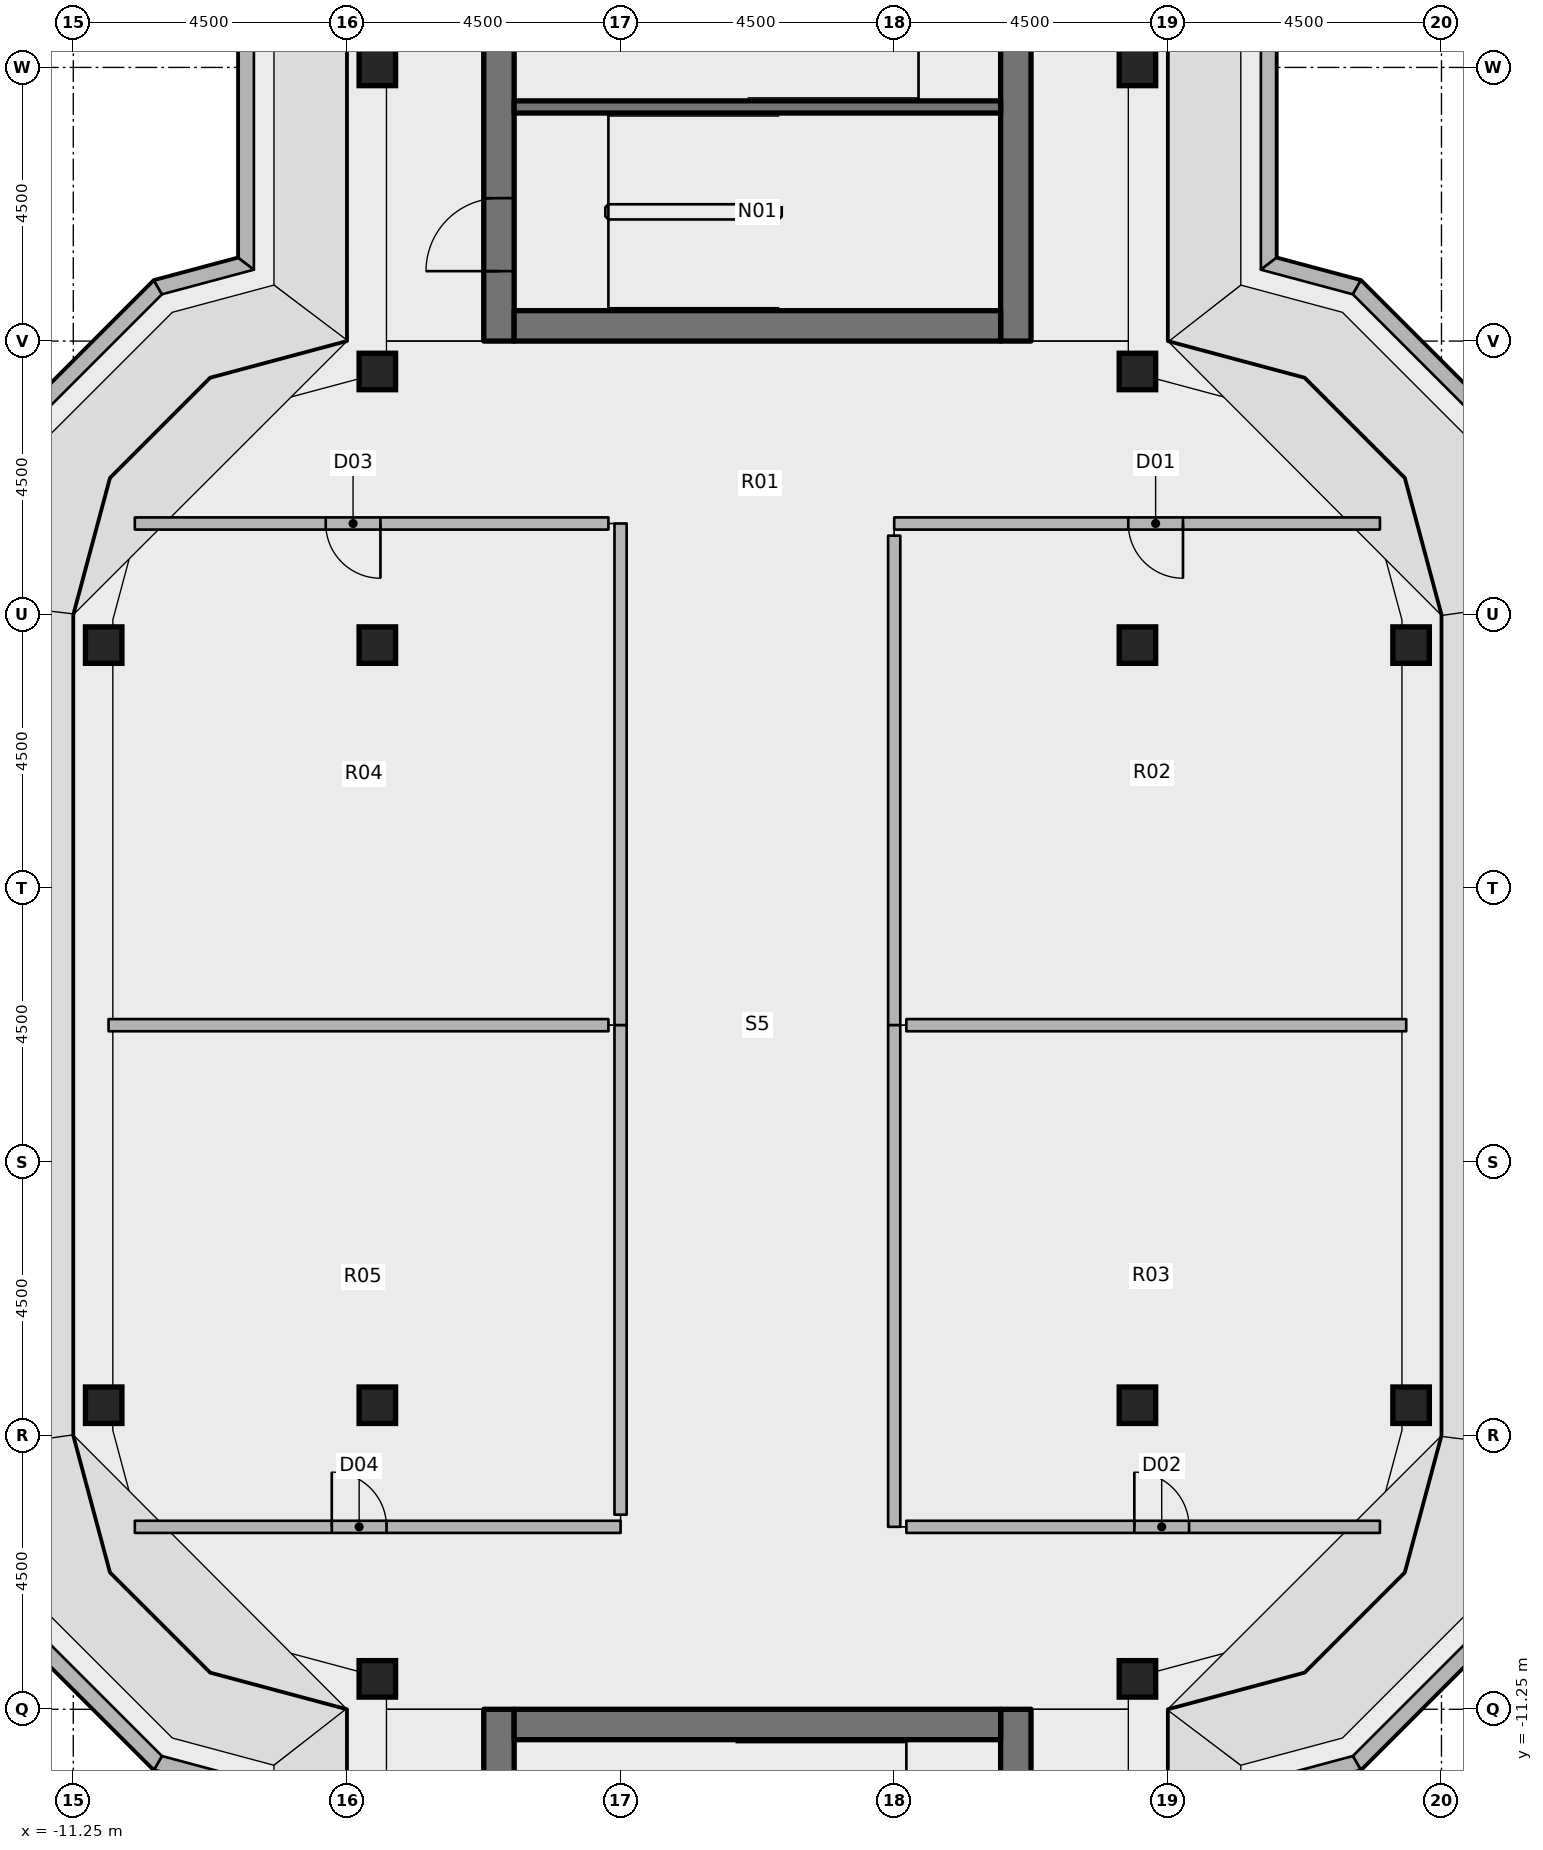
"""IFC4 building model, lengths in metres.
Left out: names, types, materials, properties, quantities, classifications, styles, units other than length and angle.
Written with IfcOpenShell. Run it as: python <this file> out.ifc"""

import sys

from ifc_helpers import new_model, si_unit, direction, frame, frame_2d, origin, origin_2d, place, context, subcontext, project, spatial, polyline, rectangle, outline, extrude, element, fill, save


model = new_model("IFC4")
c1 = context("Model", 3, precision=1e-05, world=origin(), true_north=direction((0.0, 1.0)))
c2 = subcontext(c1, "Body", "Model", "MODEL_VIEW")
j1 = project(units=[si_unit("LENGTHUNIT", "METRE"), si_unit("PLANEANGLEUNIT", "RADIAN")], contexts=[c1])
p1 = place(None, origin())
s1 = spatial("IfcSite", under=j1, at=p1, CompositionType="ELEMENT")
p2 = place(p1, origin())
s2 = spatial("IfcBuilding", under=s1, at=p2, CompositionType="ELEMENT")
p3 = place(p2, frame((0.0, 0.0, 302.4)))
s3 = spatial("IfcBuildingStorey", under=s2, at=p3, CompositionType="ELEMENT", Elevation=302.4)
for number, where, z_axis, x_axis in (
    (1, (-10.75, -6.25, 0.0), (0.0, 0.0, 1.0), (1.0, 0.0, 0.0)),
    (2, (-10.75, 6.25, 0.0), (0.0, 0.0, 1.0), (1.0, 0.0, 0.0)),
    (3, (-6.25, -10.75, 0.0), (0.0, 0.0, 1.0), (1.0, 0.0, 0.0)),
    (4, (-6.25, -6.25, 0.0), (0.0, 0.0, 1.0), (1.0, 0.0, 0.0)),
    (5, (-6.25, 6.25, 0.0), (0.0, 0.0, 1.0), (1.0, 0.0, 0.0)),
    (6, (-6.25, 10.75, 0.0), (0.0, 0.0, 1.0), (1.0, 0.0, 0.0)),
    (7, (-6.25, 15.75, 0.0), (0.0, 0.0, 1.0), (1.0, 0.0, 0.0)),
    (8, (6.25, -10.75, 0.0), (0.0, 0.0, 1.0), (1.0, 0.0, 0.0)),
    (9, (6.25, -6.25, 0.0), (0.0, 0.0, 1.0), (1.0, 0.0, 0.0)),
    (10, (6.25, 6.25, 0.0), (0.0, 0.0, 1.0), (1.0, 0.0, 0.0)),
    (11, (6.25, 10.75, 0.0), (0.0, 0.0, 1.0), (1.0, 0.0, 0.0)),
    (12, (6.25, 15.75, 0.0), (0.0, 0.0, 1.0), (1.0, 0.0, 0.0)),
    (13, (10.75, -6.25, 0.0), (0.0, 0.0, 1.0), (1.0, 0.0, 0.0)),
    (14, (10.75, 6.25, 0.0), (0.0, 0.0, 1.0), (1.0, 0.0, 0.0)),
):
    element("IfcColumn", number, at=place(p3, frame(where, z_axis=z_axis, x_axis=x_axis)), inside=s3, PredefinedType="COLUMN", context=c2, shape_type="SweptSolid", body=[
        extrude(rectangle(XDim=0.6, YDim=0.6, at=origin_2d()), origin(), (0.0, 0.0, 1.0), 3.45),
    ])
p4 = place(p3, frame((-4.25, 11.25, 0.0), z_axis=(0.0, 0.0, 1.0), x_axis=(0.0, 1.0, 0.0)))
e15 = element("IfcWall", 15, at=p4, inside=s3, PredefinedType="SHEAR", context=c2, shape_type="SweptSolid", body=[
    extrude(rectangle(XDim=15.0, YDim=0.5, at=frame_2d((7.5, 0.0))), origin(), (0.0, 0.0, 1.0), 3.6),
])
p5 = place(p4, frame((7.15, 0.0, 0.0)))
e16 = element("IfcOpeningElement", 16, at=p5, cuts=e15, PredefinedType="OPENING", context=c2, shape_type="SweptSolid", body=[
    extrude(rectangle(XDim=1.5, YDim=2.3, at=frame_2d((0.75, 1.15))), frame((0.0, 0.26, 0.0), z_axis=(0.0, -1.0, 0.0), x_axis=(1.0, 0.0, 0.0)), (0.0, 0.0, 1.0), 0.52),
])
p6 = place(p4, frame((13.9, 0.0, 0.0)))
e17 = element("IfcOpeningElement", 17, at=p6, cuts=e15, PredefinedType="OPENING", context=c2, shape_type="SweptSolid", body=[
    extrude(rectangle(XDim=0.9, YDim=2.1, at=frame_2d((0.45, 1.05))), frame((0.0, 0.26, 0.0), z_axis=(0.0, -1.0, 0.0), x_axis=(1.0, 0.0, 0.0)), (0.0, 0.0, 1.0), 0.52),
])
p7 = place(p4, frame((1.15, 0.0, 0.0)))
e18 = element("IfcOpeningElement", 18, at=p7, cuts=e15, PredefinedType="OPENING", context=c2, shape_type="SweptSolid", body=[
    extrude(rectangle(XDim=1.2, YDim=2.1, at=frame_2d((0.6, 1.05))), frame((0.0, 0.26, 0.0), z_axis=(0.0, -1.0, 0.0), x_axis=(1.0, 0.0, 0.0)), (0.0, 0.0, 1.0), 0.52),
])
p8 = place(p3, frame((4.25, 11.25, 0.0), z_axis=(0.0, 0.0, 1.0), x_axis=(0.0, 1.0, 0.0)))
e19 = element("IfcWall", 19, at=p8, inside=s3, PredefinedType="SHEAR", context=c2, shape_type="SweptSolid", body=[
    extrude(rectangle(XDim=15.0, YDim=0.5, at=frame_2d((7.5, 0.0))), origin(), (0.0, 0.0, 1.0), 3.6),
])
p9 = place(p8, frame((7.15, 0.0, 0.0)))
e20 = element("IfcOpeningElement", 20, at=p9, cuts=e19, PredefinedType="OPENING", context=c2, shape_type="SweptSolid", body=[
    extrude(rectangle(XDim=1.5, YDim=2.3, at=frame_2d((0.75, 1.15))), frame((0.0, 0.26, 0.0), z_axis=(0.0, -1.0, 0.0), x_axis=(1.0, 0.0, 0.0)), (0.0, 0.0, 1.0), 0.52),
])
p10 = place(p8, frame((5.55, 0.0, 0.0)))
e21 = element("IfcOpeningElement", 21, at=p10, cuts=e19, PredefinedType="OPENING", context=c2, shape_type="SweptSolid", body=[
    extrude(rectangle(XDim=1.2, YDim=2.1, at=frame_2d((0.6, 1.05))), frame((0.0, 0.26, 0.0), z_axis=(0.0, -1.0, 0.0), x_axis=(1.0, 0.0, 0.0)), (0.0, 0.0, 1.0), 0.52),
])
p11 = place(p3, frame((-4.0, 11.5, 0.0), z_axis=(0.0, 0.0, 1.0), x_axis=(1.0, 0.0, 0.0)))
e22 = element("IfcWall", 22, at=p11, inside=s3, PredefinedType="SHEAR", context=c2, shape_type="SweptSolid", body=[
    extrude(rectangle(XDim=8.0, YDim=0.5, at=frame_2d((4.0, 0.0))), origin(), (0.0, 0.0, 1.0), 3.6),
])
p12 = place(p3, frame((-4.25, -11.25, 0.0), z_axis=(0.0, 0.0, 1.0), x_axis=(0.0, -1.0, 0.0)))
e23 = element("IfcWall", 23, at=p12, inside=s3, PredefinedType="SHEAR", context=c2, shape_type="SweptSolid", body=[
    extrude(rectangle(XDim=15.0, YDim=0.5, at=frame_2d((7.5, 0.0))), origin(), (0.0, 0.0, 1.0), 3.6),
])
p13 = place(p12, frame((7.15, 0.0, 0.0)))
e24 = element("IfcOpeningElement", 24, at=p13, cuts=e23, PredefinedType="OPENING", context=c2, shape_type="SweptSolid", body=[
    extrude(rectangle(XDim=1.5, YDim=2.3, at=frame_2d((0.75, 1.15))), frame((0.0, 0.26, 0.0), z_axis=(0.0, -1.0, 0.0), x_axis=(1.0, 0.0, 0.0)), (0.0, 0.0, 1.0), 0.52),
])
p14 = place(p12, frame((5.55, 0.0, 0.0)))
e25 = element("IfcOpeningElement", 25, at=p14, cuts=e23, PredefinedType="OPENING", context=c2, shape_type="SweptSolid", body=[
    extrude(rectangle(XDim=1.2, YDim=2.1, at=frame_2d((0.6, 1.05))), frame((0.0, 0.26, 0.0), z_axis=(0.0, -1.0, 0.0), x_axis=(1.0, 0.0, 0.0)), (0.0, 0.0, 1.0), 0.52),
])
p15 = place(p3, frame((4.25, -11.25, 0.0), z_axis=(0.0, 0.0, 1.0), x_axis=(0.0, -1.0, 0.0)))
e26 = element("IfcWall", 26, at=p15, inside=s3, PredefinedType="SHEAR", context=c2, shape_type="SweptSolid", body=[
    extrude(rectangle(XDim=15.0, YDim=0.5, at=frame_2d((7.5, 0.0))), origin(), (0.0, 0.0, 1.0), 3.6),
])
p16 = place(p15, frame((7.15, 0.0, 0.0)))
e27 = element("IfcOpeningElement", 27, at=p16, cuts=e26, PredefinedType="OPENING", context=c2, shape_type="SweptSolid", body=[
    extrude(rectangle(XDim=1.5, YDim=2.3, at=frame_2d((0.75, 1.15))), frame((0.0, 0.26, 0.0), z_axis=(0.0, -1.0, 0.0), x_axis=(1.0, 0.0, 0.0)), (0.0, 0.0, 1.0), 0.52),
])
p17 = place(p15, frame((13.9, 0.0, 0.0)))
e28 = element("IfcOpeningElement", 28, at=p17, cuts=e26, PredefinedType="OPENING", context=c2, shape_type="SweptSolid", body=[
    extrude(rectangle(XDim=0.9, YDim=2.1, at=frame_2d((0.45, 1.05))), frame((0.0, 0.26, 0.0), z_axis=(0.0, -1.0, 0.0), x_axis=(1.0, 0.0, 0.0)), (0.0, 0.0, 1.0), 0.52),
])
p18 = place(p15, frame((1.15, 0.0, 0.0)))
e29 = element("IfcOpeningElement", 29, at=p18, cuts=e26, PredefinedType="OPENING", context=c2, shape_type="SweptSolid", body=[
    extrude(rectangle(XDim=1.2, YDim=2.1, at=frame_2d((0.6, 1.05))), frame((0.0, 0.26, 0.0), z_axis=(0.0, -1.0, 0.0), x_axis=(1.0, 0.0, 0.0)), (0.0, 0.0, 1.0), 0.52),
])
p19 = place(p3, frame((-4.0, -11.5, 0.0), z_axis=(0.0, 0.0, 1.0), x_axis=(1.0, 0.0, 0.0)))
e30 = element("IfcWall", 30, at=p19, inside=s3, PredefinedType="SHEAR", context=c2, shape_type="SweptSolid", body=[
    extrude(rectangle(XDim=8.0, YDim=0.5, at=frame_2d((4.0, 0.0))), origin(), (0.0, 0.0, 1.0), 3.6),
])
p20 = place(p3, origin())
e31 = element("IfcWall", 31, at=p20, inside=s3, PredefinedType="PARAPET", context=c2, shape_type="SweptSolid", body=[
    extrude(outline(polyline([(-8.53, -12.616), (-9.921, -12.243), (-9.792, -12.019), (-8.28, -12.424), (-8.53, -12.616)])), origin(), (0.0, 0.0, 1.0), 1.22),
])
p21 = place(p3, origin())
e32 = element("IfcWall", 32, at=p21, inside=s3, PredefinedType="PARAPET", context=c2, shape_type="SweptSolid", body=[
    extrude(outline(polyline([(-9.921, -12.243), (-12.243, -9.921), (-12.019, -9.792), (-9.792, -12.019), (-9.921, -12.243)])), origin(), (0.0, 0.0, 1.0), 1.22),
])
p22 = place(p3, origin())
e33 = element("IfcWall", 33, at=p22, inside=s3, PredefinedType="PARAPET", context=c2, shape_type="SweptSolid", body=[
    extrude(outline(polyline([(-12.243, 9.921), (-9.921, 12.243), (-9.792, 12.019), (-12.019, 9.792), (-12.243, 9.921)])), origin(), (0.0, 0.0, 1.0), 1.22),
])
p23 = place(p3, origin())
e34 = element("IfcWall", 34, at=p23, inside=s3, PredefinedType="PARAPET", context=c2, shape_type="SweptSolid", body=[
    extrude(outline(polyline([(-9.921, 12.243), (-8.53, 12.616), (-8.28, 12.424), (-9.792, 12.019), (-9.921, 12.243)])), origin(), (0.0, 0.0, 1.0), 1.22),
])
p24 = place(p3, origin())
e35 = element("IfcWall", 35, at=p24, inside=s3, PredefinedType="PARAPET", context=c2, shape_type="SweptSolid", body=[
    extrude(outline(polyline([(-8.53, 12.616), (-8.53, 24.984), (-8.28, 24.951), (-8.28, 12.424), (-8.53, 12.616)])), origin(), (0.0, 0.0, 1.0), 1.22),
])
p25 = place(p3, origin())
e36 = element("IfcWall", 36, at=p25, inside=s3, PredefinedType="PARAPET", context=c2, shape_type="SweptSolid", body=[
    extrude(outline(polyline([(8.53, 24.984), (8.53, 12.616), (8.28, 12.424), (8.28, 24.951), (8.53, 24.984)])), origin(), (0.0, 0.0, 1.0), 1.22),
])
p26 = place(p3, origin())
e37 = element("IfcWall", 37, at=p26, inside=s3, PredefinedType="PARAPET", context=c2, shape_type="SweptSolid", body=[
    extrude(outline(polyline([(8.53, 12.616), (9.921, 12.243), (9.792, 12.019), (8.28, 12.424), (8.53, 12.616)])), origin(), (0.0, 0.0, 1.0), 1.22),
])
p27 = place(p3, origin())
e38 = element("IfcWall", 38, at=p27, inside=s3, PredefinedType="PARAPET", context=c2, shape_type="SweptSolid", body=[
    extrude(outline(polyline([(9.921, 12.243), (12.243, 9.921), (12.019, 9.792), (9.792, 12.019), (9.921, 12.243)])), origin(), (0.0, 0.0, 1.0), 1.22),
])
p28 = place(p3, origin())
e39 = element("IfcWall", 39, at=p28, inside=s3, PredefinedType="PARAPET", context=c2, shape_type="SweptSolid", body=[
    extrude(outline(polyline([(12.243, -9.921), (9.921, -12.243), (9.792, -12.019), (12.019, -9.792), (12.243, -9.921)])), origin(), (0.0, 0.0, 1.0), 1.22),
])
p29 = place(p3, origin())
e40 = element("IfcWall", 40, at=p29, inside=s3, PredefinedType="PARAPET", context=c2, shape_type="SweptSolid", body=[
    extrude(outline(polyline([(9.921, -12.243), (8.53, -12.616), (8.28, -12.424), (9.792, -12.019), (9.921, -12.243)])), origin(), (0.0, 0.0, 1.0), 1.22),
])
p30 = place(p3, frame((-4.0, 15.1, 0.0), z_axis=(0.0, 0.0, 1.0), x_axis=(1.0, 0.0, 0.0)))
e41 = element("IfcWall", 41, at=p30, inside=s3, PredefinedType="SHEAR", context=c2, shape_type="SweptSolid", body=[
    extrude(rectangle(XDim=8.0, YDim=0.2, at=frame_2d((4.0, 0.0))), origin(), (0.0, 0.0, 1.0), 3.45),
])
p31 = place(p3, frame((10.238, 8.25, 0.0), z_axis=(0.0, 0.0, 1.0), x_axis=(-1.0, 0.0, 0.0)))
e42 = element("IfcWall", 42, at=p31, inside=s3, PredefinedType="PARTITIONING", context=c2, shape_type="SweptSolid", body=[
    extrude(rectangle(XDim=7.988, YDim=0.2, at=frame_2d((3.994, 0.0))), origin(), (0.0, 0.0, 1.0), 2.53),
])
p32 = place(p31, frame((3.239, 0.0, 0.0)))
e43 = element("IfcOpeningElement", 43, at=p32, cuts=e42, PredefinedType="OPENING", context=c2, shape_type="SweptSolid", body=[
    extrude(rectangle(XDim=0.9, YDim=2.1, at=frame_2d((0.45, 1.05))), frame((0.0, 0.11, 0.0), z_axis=(0.0, -1.0, 0.0), x_axis=(1.0, 0.0, 0.0)), (0.0, 0.0, 1.0), 0.22),
])
p33 = place(p3, frame((2.25, 8.05, 0.0), z_axis=(0.0, 0.0, 1.0), x_axis=(0.0, -1.0, 0.0)))
e44 = element("IfcWall", 44, at=p33, inside=s3, PredefinedType="PARTITIONING", context=c2, shape_type="SweptSolid", body=[
    extrude(rectangle(XDim=8.05, YDim=0.2, at=frame_2d((4.025, 0.0))), origin(), (0.0, 0.0, 1.0), 2.828),
])
p34 = place(p3, frame((2.25, 0.0, 0.0), z_axis=(0.0, 0.0, 1.0), x_axis=(0.0, -1.0, 0.0)))
e45 = element("IfcWall", 45, at=p34, inside=s3, PredefinedType="PARTITIONING", context=c2, shape_type="SweptSolid", body=[
    extrude(rectangle(XDim=8.25, YDim=0.2, at=frame_2d((4.125, 0.0))), origin(), (0.0, 0.0, 1.0), 2.828),
])
p35 = place(p3, frame((2.45, -8.25, 0.0), z_axis=(0.0, 0.0, 1.0), x_axis=(1.0, 0.0, 0.0)))
e46 = element("IfcWall", 46, at=p35, inside=s3, PredefinedType="PARTITIONING", context=c2, shape_type="SweptSolid", body=[
    extrude(rectangle(XDim=7.788, YDim=0.2, at=frame_2d((3.894, 0.0))), origin(), (0.0, 0.0, 1.0), 2.53),
])
p36 = place(p35, frame((3.749, 0.0, 0.0)))
e47 = element("IfcOpeningElement", 47, at=p36, cuts=e46, PredefinedType="OPENING", context=c2, shape_type="SweptSolid", body=[
    extrude(rectangle(XDim=0.9, YDim=2.1, at=frame_2d((0.45, 1.05))), frame((0.0, 0.11, 0.0), z_axis=(0.0, -1.0, 0.0), x_axis=(1.0, 0.0, 0.0)), (0.0, 0.0, 1.0), 0.22),
])
p37 = place(p3, frame((-2.25, 0.0, 0.0), z_axis=(0.0, 0.0, 1.0), x_axis=(0.0, 1.0, 0.0)))
e48 = element("IfcWall", 48, at=p37, inside=s3, PredefinedType="PARTITIONING", context=c2, shape_type="SweptSolid", body=[
    extrude(rectangle(XDim=8.25, YDim=0.2, at=frame_2d((4.125, 0.0))), origin(), (0.0, 0.0, 1.0), 2.828),
])
p38 = place(p3, frame((-2.45, 8.25, 0.0), z_axis=(0.0, 0.0, 1.0), x_axis=(-1.0, 0.0, 0.0)))
e49 = element("IfcWall", 49, at=p38, inside=s3, PredefinedType="PARTITIONING", context=c2, shape_type="SweptSolid", body=[
    extrude(rectangle(XDim=7.788, YDim=0.2, at=frame_2d((3.894, 0.0))), origin(), (0.0, 0.0, 1.0), 2.53),
])
p39 = place(p38, frame((3.749, 0.0, 0.0)))
e50 = element("IfcOpeningElement", 50, at=p39, cuts=e49, PredefinedType="OPENING", context=c2, shape_type="SweptSolid", body=[
    extrude(rectangle(XDim=0.9, YDim=2.1, at=frame_2d((0.45, 1.05))), frame((0.0, 0.11, 0.0), z_axis=(0.0, -1.0, 0.0), x_axis=(1.0, 0.0, 0.0)), (0.0, 0.0, 1.0), 0.22),
])
p40 = place(p3, frame((-10.238, -8.25, 0.0), z_axis=(0.0, 0.0, 1.0), x_axis=(1.0, 0.0, 0.0)))
e51 = element("IfcWall", 51, at=p40, inside=s3, PredefinedType="PARTITIONING", context=c2, shape_type="SweptSolid", body=[
    extrude(rectangle(XDim=7.988, YDim=0.2, at=frame_2d((3.994, 0.0))), origin(), (0.0, 0.0, 1.0), 2.53),
])
p41 = place(p40, frame((3.239, 0.0, 0.0)))
e52 = element("IfcOpeningElement", 52, at=p41, cuts=e51, PredefinedType="OPENING", context=c2, shape_type="SweptSolid", body=[
    extrude(rectangle(XDim=0.9, YDim=2.1, at=frame_2d((0.45, 1.05))), frame((0.0, 0.11, 0.0), z_axis=(0.0, -1.0, 0.0), x_axis=(1.0, 0.0, 0.0)), (0.0, 0.0, 1.0), 0.22),
])
p42 = place(p3, frame((-2.25, -8.05, 0.0), z_axis=(0.0, 0.0, 1.0), x_axis=(0.0, 1.0, 0.0)))
e53 = element("IfcWall", 53, at=p42, inside=s3, PredefinedType="PARTITIONING", context=c2, shape_type="SweptSolid", body=[
    extrude(rectangle(XDim=8.05, YDim=0.2, at=frame_2d((4.025, 0.0))), origin(), (0.0, 0.0, 1.0), 2.828),
])
for number, where, z_axis, x_axis in (
    (54, (10.67, 0.0, 0.0), (0.0, 0.0, 1.0), (-1.0, 0.0, 0.0)),
    (55, (-2.45, 0.0, 0.0), (0.0, 0.0, 1.0), (-1.0, 0.0, 0.0)),
):
    element("IfcWall", number, at=place(p3, frame(where, z_axis=z_axis, x_axis=x_axis)), inside=s3, PredefinedType="PARTITIONING", context=c2, shape_type="SweptSolid", body=[
        extrude(rectangle(XDim=8.22, YDim=0.2, at=frame_2d((4.11, 0.0))), origin(), (0.0, 0.0, 1.0), 2.53),
    ])
p43 = place(p7, origin())
e56 = element("IfcDoor", 56, at=p43, inside=s3, OperationType="SINGLE_SWING_RIGHT", PredefinedType="DOOR", context=c2, shape_type="SweptSolid", body=[
    extrude(rectangle(XDim=1.2, YDim=2.1, at=frame_2d((0.6, 1.05))), frame((0.0, 0.025, 0.0), z_axis=(0.0, -1.0, 0.0), x_axis=(1.0, 0.0, 0.0)), (0.0, 0.0, 1.0), 0.05),
])
fill(e18, e56)
p44 = place(p32, origin())
e57 = element("IfcDoor", 57, at=p44, inside=s3, OperationType="SINGLE_SWING_LEFT", PredefinedType="DOOR", context=c2, shape_type="SweptSolid", body=[
    extrude(rectangle(XDim=0.9, YDim=2.1, at=frame_2d((0.45, 1.05))), frame((0.0, 0.025, 0.0), z_axis=(0.0, -1.0, 0.0), x_axis=(1.0, 0.0, 0.0)), (0.0, 0.0, 1.0), 0.05),
])
fill(e43, e57)
p45 = place(p36, origin())
e58 = element("IfcDoor", 58, at=p45, inside=s3, OperationType="SINGLE_SWING_LEFT", PredefinedType="DOOR", context=c2, shape_type="SweptSolid", body=[
    extrude(rectangle(XDim=0.9, YDim=2.1, at=frame_2d((0.45, 1.05))), frame((0.0, 0.025, 0.0), z_axis=(0.0, -1.0, 0.0), x_axis=(1.0, 0.0, 0.0)), (0.0, 0.0, 1.0), 0.05),
])
fill(e47, e58)
p46 = place(p39, origin())
e59 = element("IfcDoor", 59, at=p46, inside=s3, OperationType="SINGLE_SWING_LEFT", PredefinedType="DOOR", context=c2, shape_type="SweptSolid", body=[
    extrude(rectangle(XDim=0.9, YDim=2.1, at=frame_2d((0.45, 1.05))), frame((0.0, 0.025, 0.0), z_axis=(0.0, -1.0, 0.0), x_axis=(1.0, 0.0, 0.0)), (0.0, 0.0, 1.0), 0.05),
])
fill(e50, e59)
p47 = place(p41, origin())
e60 = element("IfcDoor", 60, at=p47, inside=s3, OperationType="SINGLE_SWING_LEFT", PredefinedType="DOOR", context=c2, shape_type="SweptSolid", body=[
    extrude(rectangle(XDim=0.9, YDim=2.1, at=frame_2d((0.45, 1.05))), frame((0.0, 0.025, 0.0), z_axis=(0.0, -1.0, 0.0), x_axis=(1.0, 0.0, 0.0)), (0.0, 0.0, 1.0), 0.05),
])
fill(e52, e60)
save(model, sys.argv[1])
